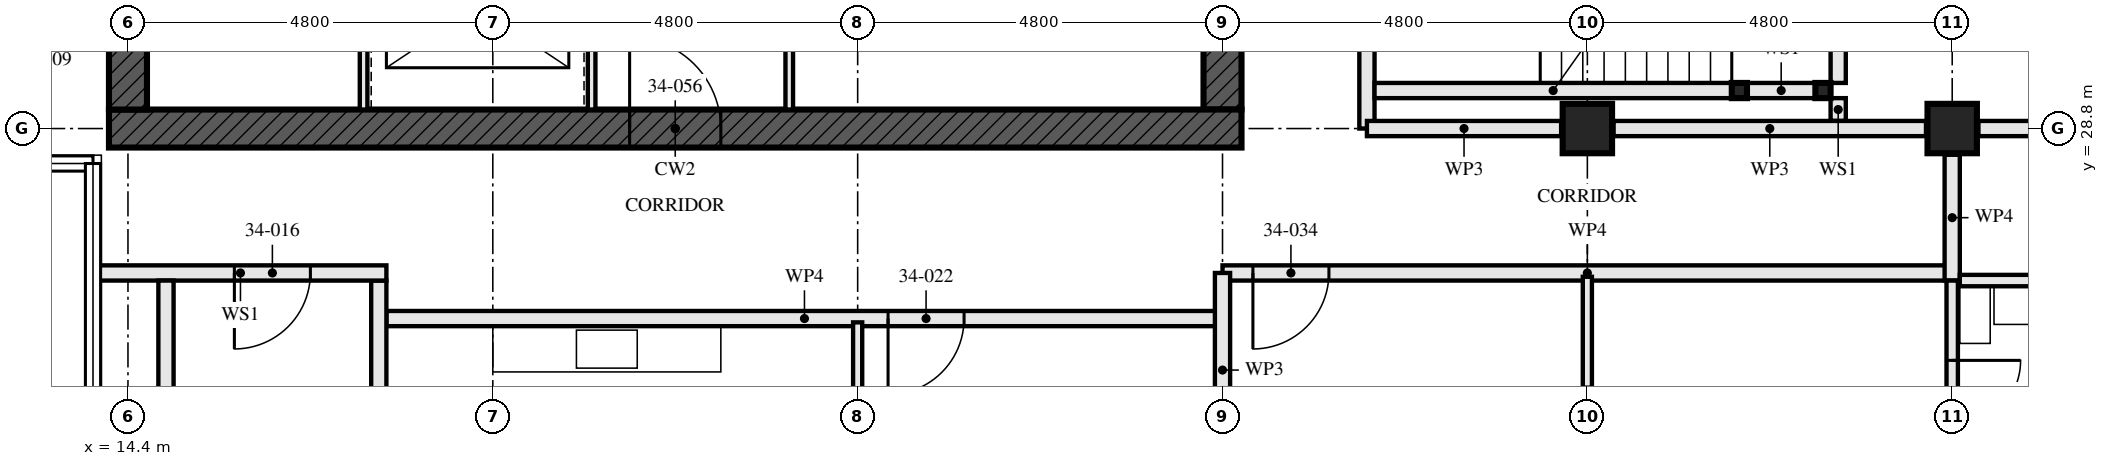
"""IFC4 building model, lengths in metres.
Left out: names, types, materials, properties, quantities, classifications, styles, units other than length and angle.
Written with IfcOpenShell. Run it as: python <this file> out.ifc"""

import sys

from ifc_helpers import new_model, si_unit, direction, frame, frame_2d, origin, origin_2d, place, context, subcontext, project, spatial, rectangle, hollow_rectangle, extrude, element, fill, save


model = new_model("IFC4")
c1 = context("Model", 3, precision=1e-05, world=origin(), true_north=direction((0.0, 1.0)))
c2 = subcontext(c1, "Body", "Model", "MODEL_VIEW")
j1 = project(units=[si_unit("LENGTHUNIT", "METRE"), si_unit("PLANEANGLEUNIT", "RADIAN")], contexts=[c1])
p1 = place(None, origin())
s1 = spatial("IfcSite", under=j1, at=p1, CompositionType="ELEMENT")
p2 = place(p1, origin())
s2 = spatial("IfcBuilding", under=s1, at=p2, CompositionType="ELEMENT")
p3 = place(p2, frame((0.0, 0.0, 126.0)))
s3 = spatial("IfcBuildingStorey", under=s2, at=p3, CompositionType="ELEMENT", Elevation=126.0)
for number, where, z_axis, x_axis in (
    (1, (33.6, 28.8, 0.0), (0.0, 0.0, 1.0), (0.0, 1.0, 0.0)),
    (2, (38.4, 28.8, 0.0), (0.0, 0.0, 1.0), (0.0, 1.0, 0.0)),
):
    element("IfcColumn", number, at=place(p3, frame(where, z_axis=z_axis, x_axis=x_axis)), inside=s3, PredefinedType="COLUMN", context=c2, shape_type="SweptSolid", body=[
        extrude(hollow_rectangle(XDim=0.65, YDim=0.65, WallThickness=0.05, at=origin_2d()), origin(), (0.0, 0.0, 1.0), 3.5),
    ])
p4 = place(p3, frame((14.15, 28.8, -0.17), z_axis=(0.0, 0.0, 1.0), x_axis=(1.0, 0.0, 0.0)))
e3 = element("IfcWall", 3, at=p4, inside=s3, PredefinedType="SHEAR", context=c2, shape_type="SweptSolid", body=[
    extrude(rectangle(XDim=14.9, YDim=0.5, at=frame_2d((7.45, 0.0))), origin(), (0.0, 0.0, 1.0), 3.5),
])
p5 = place(p4, frame((6.85, 0.0, 0.17)))
e4 = element("IfcOpeningElement", 4, at=p5, cuts=e3, PredefinedType="OPENING", context=c2, shape_type="SweptSolid", body=[
    extrude(rectangle(XDim=1.2, YDim=2.1, at=frame_2d((0.6, 1.05))), frame((0.0, 0.26, 0.0), z_axis=(0.0, -1.0, 0.0), x_axis=(1.0, 0.0, 0.0)), (0.0, 0.0, 1.0), 0.521),
])
p6 = place(p3, frame((14.4, 42.95, -0.17), z_axis=(0.0, 0.0, 1.0), x_axis=(0.0, -1.0, 0.0)))
e5 = element("IfcWall", 5, at=p6, inside=s3, PredefinedType="SHEAR", context=c2, shape_type="SweptSolid", body=[
    extrude(rectangle(XDim=13.9, YDim=0.5, at=frame_2d((6.95, 0.0))), origin(), (0.0, 0.0, 1.0), 3.5),
])
p7 = place(p6, frame((6.35, 0.0, 0.17)))
e6 = element("IfcOpeningElement", 6, at=p7, cuts=e5, PredefinedType="OPENING", context=c2, shape_type="SweptSolid", body=[
    extrude(rectangle(XDim=1.2, YDim=2.1, at=frame_2d((0.6, 1.05))), frame((0.0, 0.26, 0.0), z_axis=(0.0, -1.0, 0.0), x_axis=(1.0, 0.0, 0.0)), (0.0, 0.0, 1.0), 0.521),
])
p8 = place(p3, frame((28.8, 29.05, -0.17), z_axis=(0.0, 0.0, 1.0), x_axis=(0.0, 1.0, 0.0)))
e7 = element("IfcWall", 7, at=p8, inside=s3, PredefinedType="SHEAR", context=c2, shape_type="SweptSolid", body=[
    extrude(rectangle(XDim=13.9, YDim=0.5, at=frame_2d((6.95, 0.0))), origin(), (0.0, 0.0, 1.0), 3.5),
])
p9 = place(p8, frame((6.35, 0.0, 0.17)))
e8 = element("IfcOpeningElement", 8, at=p9, cuts=e7, PredefinedType="OPENING", context=c2, shape_type="SweptSolid", body=[
    extrude(rectangle(XDim=1.2, YDim=2.1, at=frame_2d((0.6, 1.05))), frame((0.0, 0.26, 0.0), z_axis=(0.0, -1.0, 0.0), x_axis=(1.0, 0.0, 0.0)), (0.0, 0.0, 1.0), 0.521),
])
for number, where, z_axis, x_axis in (
    (9, (36.7, 29.3, 0.0), (0.0, 0.0, 1.0), (1.0, 0.0, 0.0)),
    (10, (35.6, 29.3, 0.0), (0.0, 0.0, 1.0), (1.0, 0.0, 0.0)),
):
    element("IfcColumn", number, at=place(p3, frame(where, z_axis=z_axis, x_axis=x_axis)), inside=s3, PredefinedType="COLUMN", context=c2, shape_type="SweptSolid", body=[
        extrude(hollow_rectangle(XDim=0.2, YDim=0.2, WallThickness=0.008, at=origin_2d()), origin(), (0.0, 0.0, 1.0), 3.33),
    ])
for number, where, z_axis, x_axis in (
    (11, (14.9, 22.1, 0.0), (0.0, 0.0, 1.0), (0.0, 1.0, 0.0)),
    (12, (17.7, 22.1, 0.0), (0.0, 0.0, 1.0), (0.0, 1.0, 0.0)),
):
    element("IfcWall", number, at=place(p3, frame(where, z_axis=z_axis, x_axis=x_axis)), inside=s3, PredefinedType="SOLIDWALL", context=c2, shape_type="SweptSolid", body=[
        extrude(rectangle(XDim=4.7, YDim=0.2, at=frame_2d((2.35, 0.0))), origin(), (0.0, 0.0, 1.0), 2.99),
    ])
p10 = place(p3, frame((13.96, 26.9, 0.0), z_axis=(0.0, 0.0, 1.0), x_axis=(1.0, 0.0, 0.0)))
e13 = element("IfcWall", 13, at=p10, inside=s3, PredefinedType="SOLIDWALL", context=c2, shape_type="SweptSolid", body=[
    extrude(rectangle(XDim=3.84, YDim=0.2, at=frame_2d((1.92, 0.0))), origin(), (0.0, 0.0, 1.0), 2.32),
])
p11 = place(p10, frame((1.84, 0.0, 0.0)))
e14 = element("IfcOpeningElement", 14, at=p11, cuts=e13, PredefinedType="OPENING", context=c2, shape_type="SweptSolid", body=[
    extrude(rectangle(XDim=1.0, YDim=2.1, at=frame_2d((0.5, 1.05))), frame((0.0, 0.111, 0.0), z_axis=(0.0, -1.0, 0.0), x_axis=(1.0, 0.0, 0.0)), (0.0, 0.0, 1.0), 0.221),
])
p12 = place(p3, frame((24.0, 20.1, 0.0), z_axis=(0.0, 0.0, 1.0), x_axis=(0.0, 1.0, 0.0)))
e15 = element("IfcWall", 15, at=p12, inside=s3, PredefinedType="PARTITIONING", context=c2, shape_type="SweptSolid", body=[
    extrude(rectangle(XDim=6.15, YDim=0.12, at=frame_2d((3.075, 0.0))), origin(), (0.0, 0.0, 1.0), 2.55),
])
p13 = place(p12, frame((2.625, 0.0, 0.0)))
e16 = element("IfcOpeningElement", 16, at=p13, cuts=e15, PredefinedType="OPENING", context=c2, shape_type="SweptSolid", body=[
    extrude(rectangle(XDim=0.9, YDim=2.1, at=frame_2d((0.45, 1.05))), frame((0.0, 0.071, 0.0), z_axis=(0.0, -1.0, 0.0), x_axis=(1.0, 0.0, 0.0)), (0.0, 0.0, 1.0), 0.141),
])
p14 = place(p3, frame((17.8, 26.3, 0.0), z_axis=(0.0, 0.0, 1.0), x_axis=(1.0, 0.0, 0.0)))
e17 = element("IfcWall", 17, at=p14, inside=s3, PredefinedType="PARTITIONING", context=c2, shape_type="SweptSolid", body=[
    extrude(rectangle(XDim=11.0, YDim=0.2, at=frame_2d((5.5, 0.0))), origin(), (0.0, 0.0, 1.0), 2.55),
])
p15 = place(p14, frame((6.6, 0.0, 0.0)))
e18 = element("IfcOpeningElement", 18, at=p15, cuts=e17, PredefinedType="OPENING", context=c2, shape_type="SweptSolid", body=[
    extrude(rectangle(XDim=1.0, YDim=2.1, at=frame_2d((0.5, 1.05))), frame((0.0, 0.111, 0.0), z_axis=(0.0, -1.0, 0.0), x_axis=(1.0, 0.0, 0.0)), (0.0, 0.0, 1.0), 0.221),
])
p16 = place(p3, frame((38.4, 23.8, 0.0), z_axis=(0.0, 0.0, 1.0), x_axis=(0.0, 1.0, 0.0)))
e19 = element("IfcWall", 19, at=p16, inside=s3, PredefinedType="PARTITIONING", context=c2, shape_type="SweptSolid", body=[
    extrude(rectangle(XDim=3.0, YDim=0.15, at=frame_2d((1.5, 0.0))), origin(), (0.0, 0.0, 1.0), 2.55),
])
p17 = place(p16, frame((1.05, 0.0, 0.0)))
e20 = element("IfcOpeningElement", 20, at=p17, cuts=e19, PredefinedType="OPENING", context=c2, shape_type="SweptSolid", body=[
    extrude(rectangle(XDim=0.9, YDim=2.1, at=frame_2d((0.45, 1.05))), frame((0.0, 0.085, 0.0), z_axis=(0.0, -1.0, 0.0), x_axis=(1.0, 0.0, 0.0)), (0.0, 0.0, 1.0), 0.171),
])
p18 = place(p3, frame((33.6, 20.1, 0.0), z_axis=(0.0, 0.0, 1.0), x_axis=(0.0, 1.0, 0.0)))
e21 = element("IfcWall", 21, at=p18, inside=s3, PredefinedType="PARTITIONING", context=c2, shape_type="SweptSolid", body=[
    extrude(rectangle(XDim=6.75, YDim=0.12, at=frame_2d((3.375, 0.0))), origin(), (0.0, 0.0, 1.0), 2.55),
])
p19 = place(p18, frame((4.4, 0.0, 0.0)))
e22 = element("IfcOpeningElement", 22, at=p19, cuts=e21, PredefinedType="OPENING", context=c2, shape_type="SweptSolid", body=[
    extrude(rectangle(XDim=0.9, YDim=2.1, at=frame_2d((0.45, 1.05))), frame((0.0, 0.071, 0.0), z_axis=(0.0, -1.0, 0.0), x_axis=(1.0, 0.0, 0.0)), (0.0, 0.0, 1.0), 0.141),
])
p20 = place(p3, frame((28.8, 26.9, 0.0), z_axis=(0.0, 0.0, 1.0), x_axis=(1.0, 0.0, 0.0)))
e23 = element("IfcWall", 23, at=p20, inside=s3, PredefinedType="PARTITIONING", context=c2, shape_type="SweptSolid", body=[
    extrude(rectangle(XDim=9.6, YDim=0.2, at=frame_2d((4.8, 0.0))), origin(), (0.0, 0.0, 1.0), 3.33),
])
p21 = place(p20, frame((0.4, 0.0, 0.0)))
e24 = element("IfcOpeningElement", 24, at=p21, cuts=e23, PredefinedType="OPENING", context=c2, shape_type="SweptSolid", body=[
    extrude(rectangle(XDim=1.0, YDim=2.1, at=frame_2d((0.5, 1.05))), frame((0.0, 0.111, 0.0), z_axis=(0.0, -1.0, 0.0), x_axis=(1.0, 0.0, 0.0)), (0.0, 0.0, 1.0), 0.221),
])
p22 = place(p3, frame((38.4, 26.8, 0.0), z_axis=(0.0, 0.0, 1.0), x_axis=(0.0, 1.0, 0.0)))
e25 = element("IfcWall", 25, at=p22, inside=s3, PredefinedType="PARTITIONING", context=c2, shape_type="SweptSolid", body=[
    extrude(rectangle(XDim=1.655, YDim=0.2, at=frame_2d((0.828, 0.0))), origin(), (0.0, 0.0, 1.0), 3.33),
])
p23 = place(p3, frame((36.6, 29.3, 0.0), z_axis=(0.0, 0.0, 1.0), x_axis=(-1.0, 0.0, 0.0)))
e26 = element("IfcWall", 26, at=p23, inside=s3, PredefinedType="SOLIDWALL", context=c2, shape_type="SweptSolid", body=[
    extrude(rectangle(XDim=0.9, YDim=0.2, at=frame_2d((0.45, 0.0))), origin(), (0.0, 0.0, 1.0), 2.99),
])
p24 = place(p3, frame((35.5, 29.3, 0.0), z_axis=(0.0, 0.0, 1.0), x_axis=(-1.0, 0.0, 0.0)))
e27 = element("IfcWall", 27, at=p24, inside=s3, PredefinedType="SOLIDWALL", context=c2, shape_type="SweptSolid", body=[
    extrude(rectangle(XDim=4.7, YDim=0.2, at=frame_2d((2.35, 0.0))), origin(), (0.0, 0.0, 1.0), 2.99),
])
p25 = place(p3, frame((36.9, 28.9, 0.0), z_axis=(0.0, 0.0, 1.0), x_axis=(0.0, 1.0, 0.0)))
e28 = element("IfcWall", 28, at=p25, inside=s3, PredefinedType="SOLIDWALL", context=c2, shape_type="SweptSolid", body=[
    extrude(rectangle(XDim=0.3, YDim=0.2, at=frame_2d((0.15, 0.0))), origin(), (0.0, 0.0, 1.0), 3.33),
])
p26 = place(p3, frame((36.9, 29.4, 0.0), z_axis=(0.0, 0.0, 1.0), x_axis=(0.0, 1.0, 0.0)))
e29 = element("IfcWall", 29, at=p26, inside=s3, PredefinedType="SOLIDWALL", context=c2, shape_type="SweptSolid", body=[
    extrude(rectangle(XDim=2.6, YDim=0.2, at=frame_2d((1.3, 0.0))), origin(), (0.0, 0.0, 1.0), 3.33),
])
p27 = place(p3, frame((30.7, 28.8, 0.0), z_axis=(0.0, 0.0, 1.0), x_axis=(0.0, 1.0, 0.0)))
e30 = element("IfcWall", 30, at=p27, inside=s3, PredefinedType="PARTITIONING", context=c2, shape_type="SweptSolid", body=[
    extrude(rectangle(XDim=14.84, YDim=0.2, at=frame_2d((7.42, 0.0))), origin(), (0.0, 0.0, 1.0), 2.32),
])
p28 = place(p27, frame((1.4, 0.0, 0.0)))
e31 = element("IfcOpeningElement", 31, at=p28, cuts=e30, PredefinedType="OPENING", context=c2, shape_type="SweptSolid", body=[
    extrude(rectangle(XDim=1.0, YDim=2.1, at=frame_2d((0.5, 1.05))), frame((0.0, 0.111, 0.0), z_axis=(0.0, -1.0, 0.0), x_axis=(1.0, 0.0, 0.0)), (0.0, 0.0, 1.0), 0.221),
])
p29 = place(p27, frame((4.1, 0.0, 0.0)))
e32 = element("IfcOpeningElement", 32, at=p29, cuts=e30, PredefinedType="OPENING", context=c2, shape_type="SweptSolid", body=[
    extrude(rectangle(XDim=1.0, YDim=2.1, at=frame_2d((0.5, 1.05))), frame((0.0, 0.111, 0.0), z_axis=(0.0, -1.0, 0.0), x_axis=(1.0, 0.0, 0.0)), (0.0, 0.0, 1.0), 0.221),
])
p30 = place(p27, frame((5.975, 0.0, 0.0)))
e33 = element("IfcOpeningElement", 33, at=p30, cuts=e30, PredefinedType="OPENING", context=c2, shape_type="SweptSolid", body=[
    extrude(rectangle(XDim=1.0, YDim=2.1, at=frame_2d((0.5, 1.05))), frame((0.0, 0.111, 0.0), z_axis=(0.0, -1.0, 0.0), x_axis=(1.0, 0.0, 0.0)), (0.0, 0.0, 1.0), 0.221),
])
p31 = place(p27, frame((13.0, 0.0, 0.0)))
e34 = element("IfcOpeningElement", 34, at=p31, cuts=e30, PredefinedType="OPENING", context=c2, shape_type="SweptSolid", body=[
    extrude(rectangle(XDim=1.0, YDim=2.1, at=frame_2d((0.5, 1.05))), frame((0.0, 0.111, 0.0), z_axis=(0.0, -1.0, 0.0), x_axis=(1.0, 0.0, 0.0)), (0.0, 0.0, 1.0), 0.221),
])
p32 = place(p3, frame((20.5, 29.05, 0.0), z_axis=(0.0, 0.0, 1.0), x_axis=(0.0, 1.0, 0.0)))
e35 = element("IfcWall", 35, at=p32, inside=s3, PredefinedType="SOLIDWALL", context=c2, shape_type="SweptSolid", body=[
    extrude(rectangle(XDim=5.8, YDim=0.1, at=frame_2d((2.9, 0.0))), origin(), (0.0, 0.0, 1.0), 3.33),
])
p33 = place(p32, frame((0.8, 0.0, 0.0)))
e36 = element("IfcOpeningElement", 36, at=p33, cuts=e35, PredefinedType="OPENING", context=c2, shape_type="SweptSolid", body=[
    extrude(rectangle(XDim=1.1, YDim=2.3, at=frame_2d((0.55, 1.15))), frame((0.0, 0.061, 0.0), z_axis=(0.0, -1.0, 0.0), x_axis=(1.0, 0.0, 0.0)), (0.0, 0.0, 1.0), 0.121),
])
p34 = place(p32, frame((3.775, 0.0, 0.0)))
e37 = element("IfcOpeningElement", 37, at=p34, cuts=e35, PredefinedType="OPENING", context=c2, shape_type="SweptSolid", body=[
    extrude(rectangle(XDim=1.1, YDim=2.3, at=frame_2d((0.55, 1.15))), frame((0.0, 0.061, 0.0), z_axis=(0.0, -1.0, 0.0), x_axis=(1.0, 0.0, 0.0)), (0.0, 0.0, 1.0), 0.121),
])
p35 = place(p3, frame((23.1, 29.05, 0.0), z_axis=(0.0, 0.0, 1.0), x_axis=(0.0, 1.0, 0.0)))
e38 = element("IfcWall", 38, at=p35, inside=s3, PredefinedType="SOLIDWALL", context=c2, shape_type="SweptSolid", body=[
    extrude(rectangle(XDim=5.8, YDim=0.1, at=frame_2d((2.9, 0.0))), origin(), (0.0, 0.0, 1.0), 3.33),
])
p36 = place(p35, frame((1.0, 0.0, 0.0)))
e39 = element("IfcOpeningElement", 39, at=p36, cuts=e38, PredefinedType="OPENING", context=c2, shape_type="SweptSolid", body=[
    extrude(rectangle(XDim=0.7, YDim=2.1, at=frame_2d((0.35, 1.05))), frame((0.0, 0.061, 0.0), z_axis=(0.0, -1.0, 0.0), x_axis=(1.0, 0.0, 0.0)), (0.0, 0.0, 1.0), 0.121),
])
p37 = place(p3, frame((17.5, 29.05, 0.0), z_axis=(0.0, 0.0, 1.0), x_axis=(0.0, 1.0, 0.0)))
e40 = element("IfcWall", 40, at=p37, inside=s3, PredefinedType="SOLIDWALL", context=c2, shape_type="SweptSolid", body=[
    extrude(rectangle(XDim=5.8, YDim=0.1, at=frame_2d((2.9, 0.0))), origin(), (0.0, 0.0, 1.0), 3.33),
])
p38 = place(p3, frame((28.8, 24.345, 0.0), z_axis=(0.0, 0.0, 1.0), x_axis=(0.0, 1.0, 0.0)))
e41 = element("IfcWall", 41, at=p38, inside=s3, PredefinedType="PARTITIONING", context=c2, shape_type="SweptSolid", body=[
    extrude(rectangle(XDim=2.555, YDim=0.2, at=frame_2d((1.277, 0.0))), origin(), (0.0, 0.0, 1.0), 2.32),
])
p39 = place(p3, frame((42.88, 28.8, 0.0), z_axis=(0.0, 0.0, 1.0), x_axis=(-1.0, 0.0, 0.0)))
e42 = element("IfcWall", 42, at=p39, inside=s3, PredefinedType="PARTITIONING", context=c2, shape_type="SweptSolid", body=[
    extrude(rectangle(XDim=4.135, YDim=0.2, at=frame_2d((2.067, 0.0))), origin(), (0.0, 0.0, 1.0), 2.32),
])
p40 = place(p3, frame((38.055, 28.8, 0.0), z_axis=(0.0, 0.0, 1.0), x_axis=(-1.0, 0.0, 0.0)))
e43 = element("IfcWall", 43, at=p40, inside=s3, PredefinedType="PARTITIONING", context=c2, shape_type="SweptSolid", body=[
    extrude(rectangle(XDim=4.11, YDim=0.2, at=frame_2d((2.055, 0.0))), origin(), (0.0, 0.0, 1.0), 2.32),
])
p41 = place(p3, frame((33.255, 28.8, 0.0), z_axis=(0.0, 0.0, 1.0), x_axis=(-1.0, 0.0, 0.0)))
e44 = element("IfcWall", 44, at=p41, inside=s3, PredefinedType="PARTITIONING", context=c2, shape_type="SweptSolid", body=[
    extrude(rectangle(XDim=2.555, YDim=0.2, at=frame_2d((1.277, 0.0))), origin(), (0.0, 0.0, 1.0), 2.32),
])
p42 = place(p3, frame((38.5, 26.8, 0.0), z_axis=(0.0, 0.0, 1.0), x_axis=(1.0, 0.0, 0.0)))
e45 = element("IfcWall", 45, at=p42, inside=s3, PredefinedType="PARTITIONING", context=c2, shape_type="SweptSolid", body=[
    extrude(rectangle(XDim=5.14, YDim=0.15, at=frame_2d((2.57, 0.0))), origin(), (0.0, 0.0, 1.0), 2.32),
])
p43 = place(p11, frame((1.0, 0.0, 0.0), z_axis=(0.0, 0.0, 1.0), x_axis=(-1.0, 0.0, 0.0)))
e46 = element("IfcDoor", 46, at=p43, inside=s3, OperationType="SINGLE_SWING_LEFT", PredefinedType="DOOR", context=c2, shape_type="SweptSolid", body=[
    extrude(rectangle(XDim=1.0, YDim=2.1, at=frame_2d((0.5, 1.05))), frame((0.0, 0.032, 0.0), z_axis=(0.0, -1.0, 0.0), x_axis=(1.0, 0.0, 0.0)), (0.0, 0.0, 1.0), 0.064),
])
fill(e14, e46)
p44 = place(p15, frame((1.0, 0.0, 0.0), z_axis=(0.0, 0.0, 1.0), x_axis=(-1.0, 0.0, 0.0)))
e47 = element("IfcDoor", 47, at=p44, inside=s3, OperationType="SINGLE_SWING_LEFT", PredefinedType="DOOR", context=c2, shape_type="SweptSolid", body=[
    extrude(rectangle(XDim=1.0, YDim=2.1, at=frame_2d((0.5, 1.05))), frame((0.0, 0.027, 0.0), z_axis=(0.0, -1.0, 0.0), x_axis=(1.0, 0.0, 0.0)), (0.0, 0.0, 1.0), 0.054),
])
fill(e18, e47)
p45 = place(p17, frame((0.9, 0.0, 0.0), z_axis=(0.0, 0.0, 1.0), x_axis=(-1.0, 0.0, 0.0)))
e48 = element("IfcDoor", 48, at=p45, inside=s3, OperationType="SINGLE_SWING_RIGHT", PredefinedType="DOOR", context=c2, shape_type="SweptSolid", body=[
    extrude(rectangle(XDim=0.9, YDim=2.1, at=frame_2d((0.45, 1.05))), frame((0.0, 0.022, 0.0), z_axis=(0.0, -1.0, 0.0), x_axis=(1.0, 0.0, 0.0)), (0.0, 0.0, 1.0), 0.044),
])
fill(e20, e48)
p46 = place(p21, frame((1.0, 0.0, 0.0), z_axis=(0.0, 0.0, 1.0), x_axis=(-1.0, 0.0, 0.0)))
e49 = element("IfcDoor", 49, at=p46, inside=s3, OperationType="SINGLE_SWING_LEFT", PredefinedType="DOOR", context=c2, shape_type="SweptSolid", body=[
    extrude(rectangle(XDim=1.0, YDim=2.1, at=frame_2d((0.5, 1.05))), frame((0.0, 0.027, 0.0), z_axis=(0.0, -1.0, 0.0), x_axis=(1.0, 0.0, 0.0)), (0.0, 0.0, 1.0), 0.054),
])
fill(e24, e49)
p47 = place(p5, origin())
e50 = element("IfcDoor", 50, at=p47, inside=s3, OperationType="SINGLE_SWING_LEFT", PredefinedType="DOOR", context=c2, shape_type="SweptSolid", body=[
    extrude(rectangle(XDim=1.2, YDim=2.1, at=frame_2d((0.6, 1.05))), frame((0.0, 0.027, 0.0), z_axis=(0.0, -1.0, 0.0), x_axis=(1.0, 0.0, 0.0)), (0.0, 0.0, 1.0), 0.054),
])
fill(e4, e50)
save(model, sys.argv[1])
